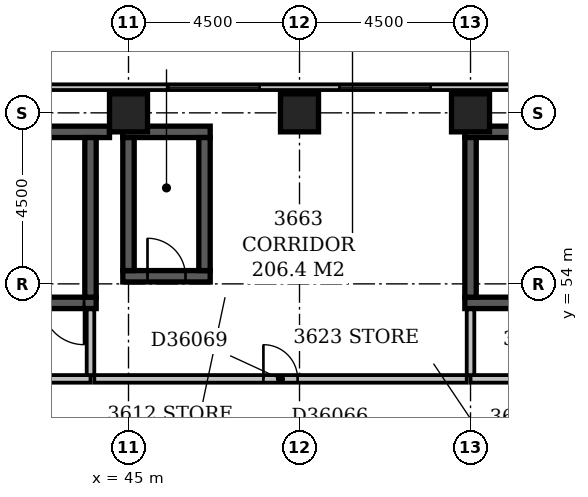
"""IFC4 building model, lengths in metres.
Left out: names, types, materials, properties, quantities, classifications, styles, units other than length and angle.
Written with IfcOpenShell. Run it as: python <this file> out.ifc"""

import sys

from ifc_helpers import new_model, si_unit, direction, frame, frame_2d, origin, origin_2d, place, context, subcontext, project, spatial, rectangle, extrude, element, fill, save


model = new_model("IFC4")
c1 = context("Model", 3, precision=1e-05, world=origin(), true_north=direction((0.0, 1.0)))
c2 = subcontext(c1, "Body", "Model", "MODEL_VIEW")
j1 = project(units=[si_unit("LENGTHUNIT", "METRE"), si_unit("PLANEANGLEUNIT", "RADIAN")], contexts=[c1])
p1 = place(None, origin())
s1 = spatial("IfcSite", under=j1, at=p1, CompositionType="ELEMENT")
p2 = place(p1, origin())
s2 = spatial("IfcBuilding", under=s1, at=p2, CompositionType="ELEMENT")
p3 = place(p2, frame((0.0, 0.0, 144.8)))
s3 = spatial("IfcBuildingStorey", under=s2, at=p3, CompositionType="ELEMENT", Elevation=144.8)
p4 = place(p3, frame((37.15, 53.5, -0.3), z_axis=(0.0, 0.0, 1.0), x_axis=(1.0, 0.0, 0.0)))
e1 = element("IfcWall", 1, at=p4, inside=s3, PredefinedType="SHEAR", context=c2, shape_type="SweptSolid", body=[
    extrude(rectangle(XDim=7.0, YDim=0.3, at=frame_2d((3.5, 0.0))), origin(), (0.0, 0.0, 1.0), 3.6),
])
p5 = place(p4, frame((5.58, 0.0, 0.3)))
e2 = element("IfcOpeningElement", 2, at=p5, cuts=e1, PredefinedType="OPENING", context=c2, shape_type="SweptSolid", body=[
    extrude(rectangle(XDim=1.1, YDim=2.1, at=frame_2d((0.55, 1.05))), frame((0.0, 0.162, 0.0), z_axis=(0.0, -1.0, 0.0), x_axis=(1.0, 0.0, 0.0)), (0.0, 0.0, 1.0), 0.324),
])
p6 = place(p3, frame((37.15, 58.0, -0.3), z_axis=(0.0, 0.0, 1.0), x_axis=(1.0, 0.0, 0.0)))
e3 = element("IfcWall", 3, at=p6, inside=s3, PredefinedType="SHEAR", context=c2, shape_type="SweptSolid", body=[
    extrude(rectangle(XDim=7.35, YDim=0.3, at=frame_2d((3.675, 0.0))), origin(), (0.0, 0.0, 1.0), 3.6),
])
p7 = place(p3, frame((44.0, 53.65, -0.3), z_axis=(0.0, 0.0, 1.0), x_axis=(0.0, 1.0, 0.0)))
e4 = element("IfcWall", 4, at=p7, inside=s3, PredefinedType="SHEAR", context=c2, shape_type="SweptSolid", body=[
    extrude(rectangle(XDim=4.2, YDim=0.3, at=frame_2d((2.1, 0.0))), origin(), (0.0, 0.0, 1.0), 3.6),
])
p8 = place(p3, frame((44.85, 54.2, -0.3), z_axis=(0.0, 0.0, 1.0), x_axis=(1.0, 0.0, 0.0)))
e5 = element("IfcWall", 5, at=p8, inside=s3, PredefinedType="SHEAR", context=c2, shape_type="SweptSolid", body=[
    extrude(rectangle(XDim=2.3, YDim=0.3, at=frame_2d((1.15, 0.0))), origin(), (0.0, 0.0, 1.0), 3.6),
])
p9 = place(p8, frame((0.65, 0.0, 0.3)))
e6 = element("IfcOpeningElement", 6, at=p9, cuts=e5, PredefinedType="OPENING", context=c2, shape_type="SweptSolid", body=[
    extrude(rectangle(XDim=1.0, YDim=2.1, at=frame_2d((0.5, 1.05))), frame((0.0, 0.162, 0.0), z_axis=(0.0, -1.0, 0.0), x_axis=(1.0, 0.0, 0.0)), (0.0, 0.0, 1.0), 0.324),
])
p10 = place(p3, frame((44.85, 58.0, -0.3), z_axis=(0.0, 0.0, 1.0), x_axis=(1.0, 0.0, 0.0)))
e7 = element("IfcWall", 7, at=p10, inside=s3, PredefinedType="SHEAR", context=c2, shape_type="SweptSolid", body=[
    extrude(rectangle(XDim=2.3, YDim=0.3, at=frame_2d((1.15, 0.0))), origin(), (0.0, 0.0, 1.0), 3.6),
])
for number, where, z_axis, x_axis in (
    (8, (45.0, 54.35, -0.3), (0.0, 0.0, 1.0), (0.0, 1.0, 0.0)),
    (9, (47.0, 54.35, -0.3), (0.0, 0.0, 1.0), (0.0, 1.0, 0.0)),
):
    element("IfcWall", number, at=place(p3, frame(where, z_axis=z_axis, x_axis=x_axis)), inside=s3, PredefinedType="SHEAR", context=c2, shape_type="SweptSolid", body=[
        extrude(rectangle(XDim=3.5, YDim=0.3, at=frame_2d((1.75, 0.0))), origin(), (0.0, 0.0, 1.0), 3.6),
    ])
p11 = place(p3, frame((53.85, 53.5, -0.3), z_axis=(0.0, 0.0, 1.0), x_axis=(1.0, 0.0, 0.0)))
e10 = element("IfcWall", 10, at=p11, inside=s3, PredefinedType="SHEAR", context=c2, shape_type="SweptSolid", body=[
    extrude(rectangle(XDim=7.0, YDim=0.3, at=frame_2d((3.5, 0.0))), origin(), (0.0, 0.0, 1.0), 3.6),
])
p12 = place(p11, frame((5.58, 0.0, 0.3)))
e11 = element("IfcOpeningElement", 11, at=p12, cuts=e10, PredefinedType="OPENING", context=c2, shape_type="SweptSolid", body=[
    extrude(rectangle(XDim=1.1, YDim=2.1, at=frame_2d((0.55, 1.05))), frame((0.0, 0.162, 0.0), z_axis=(0.0, -1.0, 0.0), x_axis=(1.0, 0.0, 0.0)), (0.0, 0.0, 1.0), 0.324),
])
p13 = place(p3, frame((53.85, 58.0, -0.3), z_axis=(0.0, 0.0, 1.0), x_axis=(1.0, 0.0, 0.0)))
e12 = element("IfcWall", 12, at=p13, inside=s3, PredefinedType="SHEAR", context=c2, shape_type="SweptSolid", body=[
    extrude(rectangle(XDim=7.0, YDim=0.3, at=frame_2d((3.5, 0.0))), origin(), (0.0, 0.0, 1.0), 3.6),
])
p14 = place(p3, frame((54.0, 53.65, -0.3), z_axis=(0.0, 0.0, 1.0), x_axis=(0.0, 1.0, 0.0)))
e13 = element("IfcWall", 13, at=p14, inside=s3, PredefinedType="SHEAR", context=c2, shape_type="SweptSolid", body=[
    extrude(rectangle(XDim=4.2, YDim=0.3, at=frame_2d((2.1, 0.0))), origin(), (0.0, 0.0, 1.0), 3.6),
])
for number, where, z_axis, x_axis in (
    (14, (45.0, 58.5, -0.3), (0.0, 0.0, 1.0), (1.0, 0.0, 0.0)),
    (15, (49.5, 58.5, -0.3), (0.0, 0.0, 1.0), (1.0, 0.0, 0.0)),
    (16, (54.0, 58.5, -0.3), (0.0, 0.0, 1.0), (1.0, 0.0, 0.0)),
):
    element("IfcColumn", number, at=place(p3, frame(where, z_axis=z_axis, x_axis=x_axis)), inside=s3, PredefinedType="COLUMN", context=c2, shape_type="SweptSolid", body=[
        extrude(rectangle(XDim=1.0, YDim=1.0, at=origin_2d()), origin(), (0.0, 0.0, 1.0), 3.6),
    ])
p15 = place(p3, frame((68.1, 59.175, 0.0), z_axis=(0.0, 0.0, 1.0), x_axis=(-1.0, 0.0, 0.0)))
e17 = element("IfcWall", 17, at=p15, inside=s3, PredefinedType="STANDARD", context=c2, shape_type="SweptSolid", body=[
    extrude(rectangle(XDim=68.85, YDim=0.15, at=frame_2d((34.425, 0.0))), origin(), (0.0, 0.0, 1.0), 2.7),
])
p16 = place(p15, frame((15.15, 0.0, 0.6)))
e18 = element("IfcOpeningElement", 18, at=p16, cuts=e17, PredefinedType="OPENING", context=c2, shape_type="SweptSolid", body=[
    extrude(rectangle(XDim=2.4, YDim=1.8, at=frame_2d((1.2, 0.9))), frame((0.0, 0.087, 0.0), z_axis=(0.0, -1.0, 0.0), x_axis=(1.0, 0.0, 0.0)), (0.0, 0.0, 1.0), 0.174),
])
p17 = place(p15, frame((19.65, 0.0, 0.6)))
e19 = element("IfcOpeningElement", 19, at=p17, cuts=e17, PredefinedType="OPENING", context=c2, shape_type="SweptSolid", body=[
    extrude(rectangle(XDim=2.4, YDim=1.8, at=frame_2d((1.2, 0.9))), frame((0.0, 0.087, 0.0), z_axis=(0.0, -1.0, 0.0), x_axis=(1.0, 0.0, 0.0)), (0.0, 0.0, 1.0), 0.174),
])
p18 = place(p15, frame((37.65, 0.0, 0.6)))
e20 = element("IfcOpeningElement", 20, at=p18, cuts=e17, PredefinedType="OPENING", context=c2, shape_type="SweptSolid", body=[
    extrude(rectangle(XDim=2.4, YDim=1.8, at=frame_2d((1.2, 0.9))), frame((0.0, 0.087, 0.0), z_axis=(0.0, -1.0, 0.0), x_axis=(1.0, 0.0, 0.0)), (0.0, 0.0, 1.0), 0.174),
])
p19 = place(p3, frame((37.3, 51.5, 0.0), z_axis=(0.0, 0.0, 1.0), x_axis=(1.0, 0.0, 0.0)))
e21 = element("IfcWall", 21, at=p19, inside=s3, PredefinedType="PARTITIONING", context=c2, shape_type="SweptSolid", body=[
    extrude(rectangle(XDim=6.7, YDim=0.2, at=frame_2d((3.35, 0.0))), origin(), (0.0, 0.0, 1.0), 3.3),
])
p20 = place(p19, frame((2.75, 0.0, 0.0)))
e22 = element("IfcOpeningElement", 22, at=p20, cuts=e21, PredefinedType="OPENING", context=c2, shape_type="SweptSolid", body=[
    extrude(rectangle(XDim=1.2, YDim=2.1, at=frame_2d((0.6, 1.05))), frame((0.0, 0.112, 0.0), z_axis=(0.0, -1.0, 0.0), x_axis=(1.0, 0.0, 0.0)), (0.0, 0.0, 1.0), 0.224),
])
p21 = place(p3, frame((44.0, 51.6, 0.0), z_axis=(0.0, 0.0, 1.0), x_axis=(0.0, 1.0, 0.0)))
e23 = element("IfcWall", 23, at=p21, inside=s3, PredefinedType="PARTITIONING", context=c2, shape_type="SweptSolid", body=[
    extrude(rectangle(XDim=1.73, YDim=0.2, at=frame_2d((0.865, 0.0))), origin(), (0.0, 0.0, 1.0), 3.3),
])
p22 = place(p3, frame((54.0, 51.5, 0.0), z_axis=(0.0, 0.0, 1.0), x_axis=(1.0, 0.0, 0.0)))
e24 = element("IfcWall", 24, at=p22, inside=s3, PredefinedType="PARTITIONING", context=c2, shape_type="SweptSolid", body=[
    extrude(rectangle(XDim=6.7, YDim=0.2, at=frame_2d((3.35, 0.0))), origin(), (0.0, 0.0, 1.0), 3.3),
])
p23 = place(p22, frame((2.75, 0.0, 0.0)))
e25 = element("IfcOpeningElement", 25, at=p23, cuts=e24, PredefinedType="OPENING", context=c2, shape_type="SweptSolid", body=[
    extrude(rectangle(XDim=1.2, YDim=2.1, at=frame_2d((0.6, 1.05))), frame((0.0, 0.112, 0.0), z_axis=(0.0, -1.0, 0.0), x_axis=(1.0, 0.0, 0.0)), (0.0, 0.0, 1.0), 0.224),
])
p24 = place(p3, frame((54.0, 51.6, 0.0), z_axis=(0.0, 0.0, 1.0), x_axis=(0.0, 1.0, 0.0)))
e26 = element("IfcWall", 26, at=p24, inside=s3, PredefinedType="PARTITIONING", context=c2, shape_type="SweptSolid", body=[
    extrude(rectangle(XDim=1.73, YDim=0.2, at=frame_2d((0.865, 0.0))), origin(), (0.0, 0.0, 1.0), 2.6),
])
p25 = place(p3, frame((44.1, 51.5, 0.0), z_axis=(0.0, 0.0, 1.0), x_axis=(1.0, 0.0, 0.0)))
e27 = element("IfcWall", 27, at=p25, inside=s3, PredefinedType="PARTITIONING", context=c2, shape_type="SweptSolid", body=[
    extrude(rectangle(XDim=9.8, YDim=0.2, at=frame_2d((4.9, 0.0))), origin(), (0.0, 0.0, 1.0), 3.3),
])
p26 = place(p25, frame((4.45, 0.0, 0.0)))
e28 = element("IfcOpeningElement", 28, at=p26, cuts=e27, PredefinedType="OPENING", context=c2, shape_type="SweptSolid", body=[
    extrude(rectangle(XDim=0.9, YDim=2.1, at=frame_2d((0.45, 1.05))), frame((0.0, 0.112, 0.0), z_axis=(0.0, -1.0, 0.0), x_axis=(1.0, 0.0, 0.0)), (0.0, 0.0, 1.0), 0.224),
])
p27 = place(p16, origin())
e29 = element("IfcWindow", 29, at=p27, inside=s3, PartitioningType="SINGLE_PANEL", PredefinedType="WINDOW", context=c2, shape_type="SweptSolid", body=[
    extrude(rectangle(XDim=2.4, YDim=1.8, at=frame_2d((1.2, 0.9))), frame((0.0, 0.03, 0.0), z_axis=(0.0, -1.0, 0.0), x_axis=(1.0, 0.0, 0.0)), (0.0, 0.0, 1.0), 0.06),
])
fill(e18, e29)
p28 = place(p17, origin())
e30 = element("IfcWindow", 30, at=p28, inside=s3, PartitioningType="SINGLE_PANEL", PredefinedType="WINDOW", context=c2, shape_type="SweptSolid", body=[
    extrude(rectangle(XDim=2.4, YDim=1.8, at=frame_2d((1.2, 0.9))), frame((0.0, 0.03, 0.0), z_axis=(0.0, -1.0, 0.0), x_axis=(1.0, 0.0, 0.0)), (0.0, 0.0, 1.0), 0.06),
])
fill(e19, e30)
p29 = place(p9, origin())
e31 = element("IfcDoor", 31, at=p29, inside=s3, OperationType="SINGLE_SWING_LEFT", PredefinedType="DOOR", context=c2, shape_type="SweptSolid", body=[
    extrude(rectangle(XDim=1.0, YDim=2.1, at=frame_2d((0.5, 1.05))), frame((0.0, 0.025, 0.0), z_axis=(0.0, -1.0, 0.0), x_axis=(1.0, 0.0, 0.0)), (0.0, 0.0, 1.0), 0.05),
])
fill(e6, e31)
p30 = place(p5, origin())
e32 = element("IfcDoor", 32, at=p30, inside=s3, OperationType="SINGLE_SWING_RIGHT", PredefinedType="DOOR", context=c2, shape_type="SweptSolid", body=[
    extrude(rectangle(XDim=1.1, YDim=2.1, at=frame_2d((0.55, 1.05))), frame((0.0, 0.025, 0.0), z_axis=(0.0, -1.0, 0.0), x_axis=(1.0, 0.0, 0.0)), (0.0, 0.0, 1.0), 0.05),
])
fill(e2, e32)
p31 = place(p26, origin())
e33 = element("IfcDoor", 33, at=p31, inside=s3, OperationType="SINGLE_SWING_LEFT", PredefinedType="DOOR", context=c2, shape_type="SweptSolid", body=[
    extrude(rectangle(XDim=0.9, YDim=2.1, at=frame_2d((0.45, 1.05))), frame((0.0, 0.025, 0.0), z_axis=(0.0, -1.0, 0.0), x_axis=(1.0, 0.0, 0.0)), (0.0, 0.0, 1.0), 0.05),
])
fill(e28, e33)
save(model, sys.argv[1])
